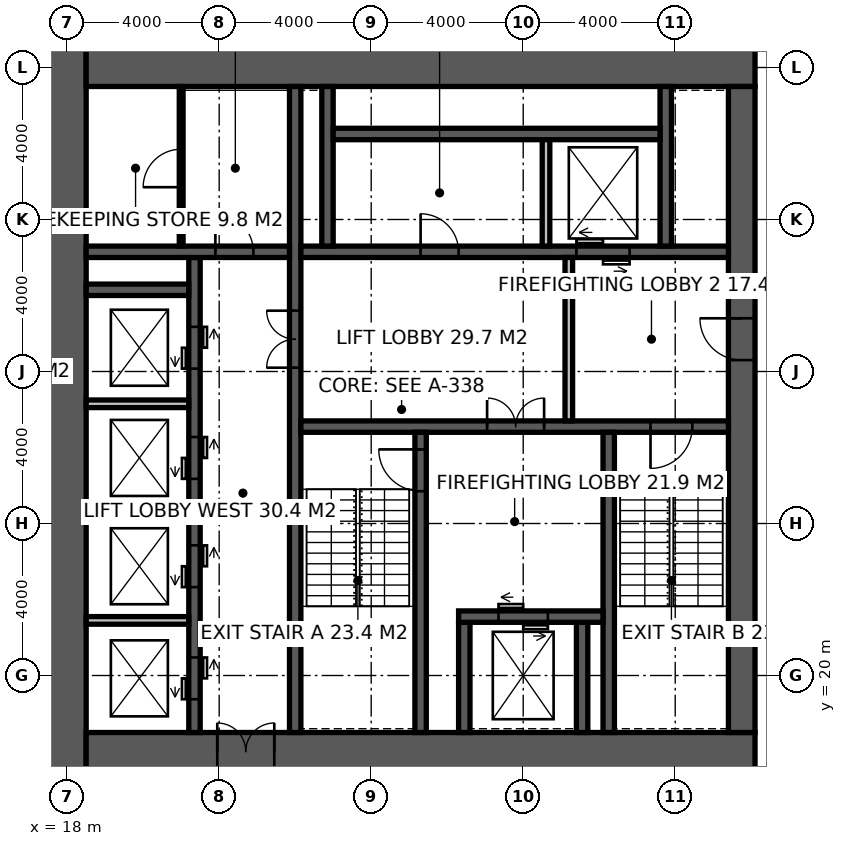
"""IFC4 building model, lengths in metres.
Left out: names, types, materials, properties, quantities, classifications, styles, units other than length and angle.
Written with IfcOpenShell. Run it as: python <this file> out.ifc"""

import sys

from ifc_helpers import new_model, si_unit, direction, frame, frame_2d, origin, place, context, subcontext, project, spatial, rectangle, extrude, element, fill, save


model = new_model("IFC4")
c1 = context("Model", 3, precision=1e-05, world=origin(), true_north=direction((0.0, 1.0)))
c2 = subcontext(c1, "Body", "Model", "MODEL_VIEW")
j1 = project(units=[si_unit("LENGTHUNIT", "METRE"), si_unit("PLANEANGLEUNIT", "RADIAN")], contexts=[c1])
p1 = place(None, origin())
s1 = spatial("IfcSite", under=j1, at=p1, CompositionType="ELEMENT")
p2 = place(p1, origin())
s2 = spatial("IfcBuilding", under=s1, at=p2, CompositionType="ELEMENT")
p3 = place(p2, frame((0.0, 0.0, 238.2)))
s3 = spatial("IfcBuildingStorey", under=s2, at=p3, CompositionType="ELEMENT", Elevation=238.2)
p4 = place(p3, frame((18.0, 17.5, -0.15), z_axis=(0.0, 0.0, 1.0), x_axis=(0.0, 1.0, 0.0)))
e1 = element("IfcWall", 1, at=p4, inside=s3, PredefinedType="SHEAR", context=c2, shape_type="SweptSolid", body=[
    extrude(rectangle(XDim=19.0, YDim=1.0, at=frame_2d((9.5, 0.0))), origin(), (0.0, 0.0, 1.0), 4.0),
])
p5 = place(p3, frame((18.5, 18.0, -0.15), z_axis=(0.0, 0.0, 1.0), x_axis=(1.0, 0.0, 0.0)))
e2 = element("IfcWall", 2, at=p5, inside=s3, PredefinedType="SHEAR", context=c2, shape_type="SweptSolid", body=[
    extrude(rectangle(XDim=17.6, YDim=1.0, at=frame_2d((8.8, 0.0))), origin(), (0.0, 0.0, 1.0), 4.0),
])
p6 = place(p5, frame((3.45, 0.0, 0.15)))
e3 = element("IfcOpeningElement", 3, at=p6, cuts=e2, PredefinedType="OPENING", context=c2, shape_type="SweptSolid", body=[
    extrude(rectangle(XDim=1.5, YDim=2.4, at=frame_2d((0.75, 1.2))), frame((0.0, 0.51, 0.0), z_axis=(0.0, -1.0, 0.0), x_axis=(1.0, 0.0, 0.0)), (0.0, 0.0, 1.0), 1.02),
])
p7 = place(p3, frame((18.5, 36.0, -0.15), z_axis=(0.0, 0.0, 1.0), x_axis=(1.0, 0.0, 0.0)))
e4 = element("IfcWall", 4, at=p7, inside=s3, PredefinedType="SHEAR", context=c2, shape_type="SweptSolid", body=[
    extrude(rectangle(XDim=17.6, YDim=1.0, at=frame_2d((8.8, 0.0))), origin(), (0.0, 0.0, 1.0), 4.0),
])
p8 = place(p3, frame((35.75, 18.5, -0.15), z_axis=(0.0, 0.0, 1.0), x_axis=(0.0, 1.0, 0.0)))
e5 = element("IfcWall", 5, at=p8, inside=s3, PredefinedType="SHEAR", context=c2, shape_type="SweptSolid", body=[
    extrude(rectangle(XDim=17.0, YDim=0.7, at=frame_2d((8.5, 0.0))), origin(), (0.0, 0.0, 1.0), 4.0),
])
p9 = place(p8, frame((9.8, 0.0, 0.15)))
e6 = element("IfcOpeningElement", 6, at=p9, cuts=e5, PredefinedType="OPENING", context=c2, shape_type="SweptSolid", body=[
    extrude(rectangle(XDim=1.1, YDim=2.2, at=frame_2d((0.55, 1.1))), frame((0.0, 0.36, 0.0), z_axis=(0.0, -1.0, 0.0), x_axis=(1.0, 0.0, 0.0)), (0.0, 0.0, 1.0), 0.72),
])
p10 = place(p3, frame((24.0, 18.5, -0.15), z_axis=(0.0, 0.0, 1.0), x_axis=(0.0, 1.0, 0.0)))
e7 = element("IfcWall", 7, at=p10, inside=s3, PredefinedType="SHEAR", context=c2, shape_type="SweptSolid", body=[
    extrude(rectangle(XDim=17.0, YDim=0.3, at=frame_2d((8.5, 0.0))), origin(), (0.0, 0.0, 1.0), 4.0),
])
p11 = place(p10, frame((9.6, 0.0, 0.15)))
e8 = element("IfcOpeningElement", 8, at=p11, cuts=e7, PredefinedType="OPENING", context=c2, shape_type="SweptSolid", body=[
    extrude(rectangle(XDim=1.5, YDim=2.4, at=frame_2d((0.75, 1.2))), frame((0.0, 0.16, 0.0), z_axis=(0.0, -1.0, 0.0), x_axis=(1.0, 0.0, 0.0)), (0.0, 0.0, 1.0), 0.32),
])
p12 = place(p3, frame((24.15, 26.55, -0.15), z_axis=(0.0, 0.0, 1.0), x_axis=(1.0, 0.0, 0.0)))
e9 = element("IfcWall", 9, at=p12, inside=s3, PredefinedType="SHEAR", context=c2, shape_type="SweptSolid", body=[
    extrude(rectangle(XDim=11.25, YDim=0.3, at=frame_2d((5.625, 0.0))), origin(), (0.0, 0.0, 1.0), 4.0),
])
p13 = place(p12, frame((9.2, 0.0, 0.15)))
e10 = element("IfcOpeningElement", 10, at=p13, cuts=e9, PredefinedType="OPENING", context=c2, shape_type="SweptSolid", body=[
    extrude(rectangle(XDim=1.1, YDim=2.2, at=frame_2d((0.55, 1.1))), frame((0.0, 0.16, 0.0), z_axis=(0.0, -1.0, 0.0), x_axis=(1.0, 0.0, 0.0)), (0.0, 0.0, 1.0), 0.32),
])
p14 = place(p12, frame((4.9, 0.0, 0.15)))
e11 = element("IfcOpeningElement", 11, at=p14, cuts=e9, PredefinedType="OPENING", context=c2, shape_type="SweptSolid", body=[
    extrude(rectangle(XDim=1.5, YDim=2.4, at=frame_2d((0.75, 1.2))), frame((0.0, 0.16, 0.0), z_axis=(0.0, -1.0, 0.0), x_axis=(1.0, 0.0, 0.0)), (0.0, 0.0, 1.0), 0.32),
])
p15 = place(p3, frame((27.3, 18.5, -0.15), z_axis=(0.0, 0.0, 1.0), x_axis=(0.0, 1.0, 0.0)))
e12 = element("IfcWall", 12, at=p15, inside=s3, PredefinedType="SHEAR", context=c2, shape_type="SweptSolid", body=[
    extrude(rectangle(XDim=7.9, YDim=0.3, at=frame_2d((3.95, 0.0))), origin(), (0.0, 0.0, 1.0), 4.0),
])
p16 = place(p15, frame((6.35, 0.0, 0.15)))
e13 = element("IfcOpeningElement", 13, at=p16, cuts=e12, PredefinedType="OPENING", context=c2, shape_type="SweptSolid", body=[
    extrude(rectangle(XDim=1.1, YDim=2.2, at=frame_2d((0.55, 1.1))), frame((0.0, 0.16, 0.0), z_axis=(0.0, -1.0, 0.0), x_axis=(1.0, 0.0, 0.0)), (0.0, 0.0, 1.0), 0.32),
])
p17 = place(p3, frame((32.25, 18.5, -0.15), z_axis=(0.0, 0.0, 1.0), x_axis=(0.0, 1.0, 0.0)))
e14 = element("IfcWall", 14, at=p17, inside=s3, PredefinedType="SHEAR", context=c2, shape_type="SweptSolid", body=[
    extrude(rectangle(XDim=7.9, YDim=0.3, at=frame_2d((3.95, 0.0))), origin(), (0.0, 0.0, 1.0), 4.0),
])
for number, where, z_axis, x_axis in (
    (15, (28.45, 18.5, -0.15), (0.0, 0.0, 1.0), (0.0, 1.0, 0.0)),
    (16, (31.55, 18.5, -0.15), (0.0, 0.0, 1.0), (0.0, 1.0, 0.0)),
):
    element("IfcWall", number, at=place(p3, frame(where, z_axis=z_axis, x_axis=x_axis)), inside=s3, PredefinedType="SHEAR", context=c2, shape_type="SweptSolid", body=[
        extrude(rectangle(XDim=2.9, YDim=0.3, at=frame_2d((1.45, 0.0))), origin(), (0.0, 0.0, 1.0), 4.0),
    ])
p18 = place(p3, frame((28.3, 21.55, -0.15), z_axis=(0.0, 0.0, 1.0), x_axis=(1.0, 0.0, 0.0)))
e17 = element("IfcWall", 17, at=p18, inside=s3, PredefinedType="SHEAR", context=c2, shape_type="SweptSolid", body=[
    extrude(rectangle(XDim=3.8, YDim=0.3, at=frame_2d((1.9, 0.0))), origin(), (0.0, 0.0, 1.0), 4.0),
])
p19 = place(p18, frame((1.05, 0.0, 0.15)))
e18 = element("IfcOpeningElement", 18, at=p19, cuts=e17, PredefinedType="OPENING", context=c2, shape_type="SweptSolid", body=[
    extrude(rectangle(XDim=1.3, YDim=2.4, at=frame_2d((0.65, 1.2))), frame((0.0, 0.16, 0.0), z_axis=(0.0, -1.0, 0.0), x_axis=(1.0, 0.0, 0.0)), (0.0, 0.0, 1.0), 0.32),
])
p20 = place(p3, frame((24.15, 31.15, -0.15), z_axis=(0.0, 0.0, 1.0), x_axis=(1.0, 0.0, 0.0)))
e19 = element("IfcWall", 19, at=p20, inside=s3, PredefinedType="SHEAR", context=c2, shape_type="SweptSolid", body=[
    extrude(rectangle(XDim=11.25, YDim=0.3, at=frame_2d((5.625, 0.0))), origin(), (0.0, 0.0, 1.0), 4.0),
])
p21 = place(p20, frame((3.15, 0.0, 0.15)))
e20 = element("IfcOpeningElement", 20, at=p21, cuts=e19, PredefinedType="OPENING", context=c2, shape_type="SweptSolid", body=[
    extrude(rectangle(XDim=1.0, YDim=2.2, at=frame_2d((0.5, 1.1))), frame((0.0, 0.16, 0.0), z_axis=(0.0, -1.0, 0.0), x_axis=(1.0, 0.0, 0.0)), (0.0, 0.0, 1.0), 0.32),
])
p22 = place(p20, frame((7.25, 0.0, 0.15)))
e21 = element("IfcOpeningElement", 21, at=p22, cuts=e19, PredefinedType="OPENING", context=c2, shape_type="SweptSolid", body=[
    extrude(rectangle(XDim=1.4, YDim=2.4, at=frame_2d((0.7, 1.2))), frame((0.0, 0.16, 0.0), z_axis=(0.0, -1.0, 0.0), x_axis=(1.0, 0.0, 0.0)), (0.0, 0.0, 1.0), 0.32),
])
p23 = place(p3, frame((21.35, 18.5, -0.15), z_axis=(0.0, 0.0, 1.0), x_axis=(0.0, 1.0, 0.0)))
e22 = element("IfcWall", 22, at=p23, inside=s3, PredefinedType="SHEAR", context=c2, shape_type="SweptSolid", body=[
    extrude(rectangle(XDim=12.5, YDim=0.3, at=frame_2d((6.25, 0.0))), origin(), (0.0, 0.0, 1.0), 4.0),
])
p24 = place(p23, frame((0.875, 0.0, 0.15)))
e23 = element("IfcOpeningElement", 23, at=p24, cuts=e22, PredefinedType="OPENING", context=c2, shape_type="SweptSolid", body=[
    extrude(rectangle(XDim=1.1, YDim=2.2, at=frame_2d((0.55, 1.1))), frame((0.0, 0.16, 0.0), z_axis=(0.0, -1.0, 0.0), x_axis=(1.0, 0.0, 0.0)), (0.0, 0.0, 1.0), 0.32),
])
p25 = place(p23, frame((3.825, 0.0, 0.15)))
e24 = element("IfcOpeningElement", 24, at=p25, cuts=e22, PredefinedType="OPENING", context=c2, shape_type="SweptSolid", body=[
    extrude(rectangle(XDim=1.1, YDim=2.2, at=frame_2d((0.55, 1.1))), frame((0.0, 0.16, 0.0), z_axis=(0.0, -1.0, 0.0), x_axis=(1.0, 0.0, 0.0)), (0.0, 0.0, 1.0), 0.32),
])
p26 = place(p23, frame((6.675, 0.0, 0.15)))
e25 = element("IfcOpeningElement", 25, at=p26, cuts=e22, PredefinedType="OPENING", context=c2, shape_type="SweptSolid", body=[
    extrude(rectangle(XDim=1.1, YDim=2.2, at=frame_2d((0.55, 1.1))), frame((0.0, 0.16, 0.0), z_axis=(0.0, -1.0, 0.0), x_axis=(1.0, 0.0, 0.0)), (0.0, 0.0, 1.0), 0.32),
])
p27 = place(p23, frame((9.575, 0.0, 0.15)))
e26 = element("IfcOpeningElement", 26, at=p27, cuts=e22, PredefinedType="OPENING", context=c2, shape_type="SweptSolid", body=[
    extrude(rectangle(XDim=1.1, YDim=2.2, at=frame_2d((0.55, 1.1))), frame((0.0, 0.16, 0.0), z_axis=(0.0, -1.0, 0.0), x_axis=(1.0, 0.0, 0.0)), (0.0, 0.0, 1.0), 0.32),
])
p28 = place(p3, frame((18.5, 31.15, -0.15), z_axis=(0.0, 0.0, 1.0), x_axis=(1.0, 0.0, 0.0)))
e27 = element("IfcWall", 27, at=p28, inside=s3, PredefinedType="SHEAR", context=c2, shape_type="SweptSolid", body=[
    extrude(rectangle(XDim=5.35, YDim=0.3, at=frame_2d((2.675, 0.0))), origin(), (0.0, 0.0, 1.0), 4.0),
])
p29 = place(p28, frame((3.4, 0.0, 0.15)))
e28 = element("IfcOpeningElement", 28, at=p29, cuts=e27, PredefinedType="OPENING", context=c2, shape_type="SweptSolid", body=[
    extrude(rectangle(XDim=1.0, YDim=2.2, at=frame_2d((0.5, 1.1))), frame((0.0, 0.16, 0.0), z_axis=(0.0, -1.0, 0.0), x_axis=(1.0, 0.0, 0.0)), (0.0, 0.0, 1.0), 0.32),
])
p30 = place(p3, frame((18.5, 30.15, -0.15), z_axis=(0.0, 0.0, 1.0), x_axis=(1.0, 0.0, 0.0)))
e29 = element("IfcWall", 29, at=p30, inside=s3, PredefinedType="SHEAR", context=c2, shape_type="SweptSolid", body=[
    extrude(rectangle(XDim=2.7, YDim=0.3, at=frame_2d((1.35, 0.0))), origin(), (0.0, 0.0, 1.0), 4.0),
])
for number, where, z_axis, x_axis in (
    (30, (24.85, 31.3, -0.15), (0.0, 0.0, 1.0), (0.0, 1.0, 0.0)),
    (31, (33.75, 31.3, -0.15), (0.0, 0.0, 1.0), (0.0, 1.0, 0.0)),
):
    element("IfcWall", number, at=place(p3, frame(where, z_axis=z_axis, x_axis=x_axis)), inside=s3, PredefinedType="SHEAR", context=c2, shape_type="SweptSolid", body=[
        extrude(rectangle(XDim=4.2, YDim=0.3, at=frame_2d((2.1, 0.0))), origin(), (0.0, 0.0, 1.0), 4.0),
    ])
p31 = place(p3, frame((25.0, 34.25, -0.15), z_axis=(0.0, 0.0, 1.0), x_axis=(1.0, 0.0, 0.0)))
e32 = element("IfcWall", 32, at=p31, inside=s3, PredefinedType="SHEAR", context=c2, shape_type="SweptSolid", body=[
    extrude(rectangle(XDim=8.6, YDim=0.3, at=frame_2d((4.3, 0.0))), origin(), (0.0, 0.0, 1.0), 4.0),
])
p32 = place(p3, frame((30.6, 31.3, -0.15), z_axis=(0.0, 0.0, 1.0), x_axis=(0.0, 1.0, 0.0)))
e33 = element("IfcWall", 33, at=p32, inside=s3, PredefinedType="SOLIDWALL", context=c2, shape_type="SweptSolid", body=[
    extrude(rectangle(XDim=2.8, YDim=0.2, at=frame_2d((1.4, 0.0))), origin(), (0.0, 0.0, 1.0), 4.0),
])
for number, where, z_axis, x_axis in (
    (34, (18.5, 21.45, -0.15), (0.0, 0.0, 1.0), (1.0, 0.0, 0.0)),
    (35, (18.5, 24.3, -0.15), (0.0, 0.0, 1.0), (1.0, 0.0, 0.0)),
    (36, (18.5, 27.15, -0.15), (0.0, 0.0, 1.0), (1.0, 0.0, 0.0)),
):
    element("IfcWall", number, at=place(p3, frame(where, z_axis=z_axis, x_axis=x_axis)), inside=s3, PredefinedType="SOLIDWALL", context=c2, shape_type="SweptSolid", body=[
        extrude(rectangle(XDim=2.7, YDim=0.2, at=frame_2d((1.35, 0.0))), origin(), (0.0, 0.0, 1.0), 4.0),
    ])
p33 = place(p3, frame((31.2, 26.7, 0.0), z_axis=(0.0, 0.0, 1.0), x_axis=(0.0, 1.0, 0.0)))
e37 = element("IfcWall", 37, at=p33, inside=s3, PredefinedType="SOLIDWALL", context=c2, shape_type="SweptSolid", body=[
    extrude(rectangle(XDim=4.3, YDim=0.2, at=frame_2d((2.15, 0.0))), origin(), (0.0, 0.0, 1.0), 3.85),
])
p34 = place(p3, frame((21.0, 31.3, 0.0), z_axis=(0.0, 0.0, 1.0), x_axis=(0.0, 1.0, 0.0)))
e38 = element("IfcWall", 38, at=p34, inside=s3, PredefinedType="PARTITIONING", context=c2, shape_type="SweptSolid", body=[
    extrude(rectangle(XDim=4.2, YDim=0.1, at=frame_2d((2.1, 0.0))), origin(), (0.0, 0.0, 1.0), 3.85),
])
p35 = place(p34, frame((1.55, 0.0, 0.0)))
e39 = element("IfcOpeningElement", 39, at=p35, cuts=e38, PredefinedType="OPENING", context=c2, shape_type="SweptSolid", body=[
    extrude(rectangle(XDim=1.0, YDim=2.2, at=frame_2d((0.5, 1.1))), frame((0.0, 0.06, 0.0), z_axis=(0.0, -1.0, 0.0), x_axis=(1.0, 0.0, 0.0)), (0.0, 0.0, 1.0), 0.12),
])
p36 = place(p16, origin())
e40 = element("IfcDoor", 40, at=p36, inside=s3, OperationType="SINGLE_SWING_RIGHT", PredefinedType="DOOR", context=c2, shape_type="SweptSolid", body=[
    extrude(rectangle(XDim=1.1, YDim=2.2, at=frame_2d((0.55, 1.1))), frame((0.0, 0.025, 0.0), z_axis=(0.0, -1.0, 0.0), x_axis=(1.0, 0.0, 0.0)), (0.0, 0.0, 1.0), 0.05),
])
fill(e13, e40)
p37 = place(p13, frame((1.1, 0.0, 0.0), z_axis=(0.0, 0.0, 1.0), x_axis=(-1.0, 0.0, 0.0)))
e41 = element("IfcDoor", 41, at=p37, inside=s3, OperationType="SINGLE_SWING_RIGHT", PredefinedType="DOOR", context=c2, shape_type="SweptSolid", body=[
    extrude(rectangle(XDim=1.1, YDim=2.2, at=frame_2d((0.55, 1.1))), frame((0.0, 0.025, 0.0), z_axis=(0.0, -1.0, 0.0), x_axis=(1.0, 0.0, 0.0)), (0.0, 0.0, 1.0), 0.05),
])
fill(e10, e41)
p38 = place(p9, origin())
e42 = element("IfcDoor", 42, at=p38, inside=s3, OperationType="SINGLE_SWING_RIGHT", PredefinedType="DOOR", context=c2, shape_type="SweptSolid", body=[
    extrude(rectangle(XDim=1.1, YDim=2.2, at=frame_2d((0.55, 1.1))), frame((0.0, 0.025, 0.0), z_axis=(0.0, -1.0, 0.0), x_axis=(1.0, 0.0, 0.0)), (0.0, 0.0, 1.0), 0.05),
])
fill(e6, e42)
p39 = place(p14, origin())
e43 = element("IfcDoor", 43, at=p39, inside=s3, OperationType="DOUBLE_DOOR_DOUBLE_SWING", PredefinedType="DOOR", context=c2, shape_type="SweptSolid", body=[
    extrude(rectangle(XDim=1.5, YDim=2.4, at=frame_2d((0.75, 1.2))), frame((0.0, 0.025, 0.0), z_axis=(0.0, -1.0, 0.0), x_axis=(1.0, 0.0, 0.0)), (0.0, 0.0, 1.0), 0.05),
])
fill(e11, e43)
p40 = place(p11, origin())
e44 = element("IfcDoor", 44, at=p40, inside=s3, OperationType="DOUBLE_DOOR_DOUBLE_SWING", PredefinedType="DOOR", context=c2, shape_type="SweptSolid", body=[
    extrude(rectangle(XDim=1.5, YDim=2.4, at=frame_2d((0.75, 1.2))), frame((0.0, 0.025, 0.0), z_axis=(0.0, -1.0, 0.0), x_axis=(1.0, 0.0, 0.0)), (0.0, 0.0, 1.0), 0.05),
])
fill(e8, e44)
p41 = place(p29, origin())
e45 = element("IfcDoor", 45, at=p41, inside=s3, OperationType="SINGLE_SWING_LEFT", PredefinedType="DOOR", context=c2, shape_type="SweptSolid", body=[
    extrude(rectangle(XDim=1.0, YDim=2.2, at=frame_2d((0.5, 1.1))), frame((0.0, 0.025, 0.0), z_axis=(0.0, -1.0, 0.0), x_axis=(1.0, 0.0, 0.0)), (0.0, 0.0, 1.0), 0.05),
])
fill(e28, e45)
p42 = place(p35, origin())
e46 = element("IfcDoor", 46, at=p42, inside=s3, OperationType="SINGLE_SWING_LEFT", PredefinedType="DOOR", context=c2, shape_type="SweptSolid", body=[
    extrude(rectangle(XDim=1.0, YDim=2.2, at=frame_2d((0.5, 1.1))), frame((0.0, 0.025, 0.0), z_axis=(0.0, -1.0, 0.0), x_axis=(1.0, 0.0, 0.0)), (0.0, 0.0, 1.0), 0.05),
])
fill(e39, e46)
p43 = place(p21, origin())
e47 = element("IfcDoor", 47, at=p43, inside=s3, OperationType="SINGLE_SWING_LEFT", PredefinedType="DOOR", context=c2, shape_type="SweptSolid", body=[
    extrude(rectangle(XDim=1.0, YDim=2.2, at=frame_2d((0.5, 1.1))), frame((0.0, 0.025, 0.0), z_axis=(0.0, -1.0, 0.0), x_axis=(1.0, 0.0, 0.0)), (0.0, 0.0, 1.0), 0.05),
])
fill(e20, e47)
p44 = place(p6, origin())
e48 = element("IfcDoor", 48, at=p44, inside=s3, OperationType="DOUBLE_DOOR_DOUBLE_SWING", PredefinedType="DOOR", context=c2, shape_type="SweptSolid", body=[
    extrude(rectangle(XDim=1.5, YDim=2.4, at=frame_2d((0.75, 1.2))), frame((0.0, 0.025, 0.0), z_axis=(0.0, -1.0, 0.0), x_axis=(1.0, 0.0, 0.0)), (0.0, 0.0, 1.0), 0.05),
])
fill(e3, e48)
p45 = place(p19, origin())
e49 = element("IfcDoor", 49, at=p45, inside=s3, OperationType="DOUBLE_DOOR_SLIDING", PredefinedType="DOOR", context=c2, shape_type="SweptSolid", body=[
    extrude(rectangle(XDim=1.3, YDim=2.4, at=frame_2d((0.65, 1.2))), frame((0.0, 0.025, 0.0), z_axis=(0.0, -1.0, 0.0), x_axis=(1.0, 0.0, 0.0)), (0.0, 0.0, 1.0), 0.05),
])
fill(e18, e49)
p46 = place(p22, origin())
e50 = element("IfcDoor", 50, at=p46, inside=s3, OperationType="DOUBLE_DOOR_SLIDING", PredefinedType="DOOR", context=c2, shape_type="SweptSolid", body=[
    extrude(rectangle(XDim=1.4, YDim=2.4, at=frame_2d((0.7, 1.2))), frame((0.0, 0.025, 0.0), z_axis=(0.0, -1.0, 0.0), x_axis=(1.0, 0.0, 0.0)), (0.0, 0.0, 1.0), 0.05),
])
fill(e21, e50)
p47 = place(p24, origin())
e51 = element("IfcDoor", 51, at=p47, inside=s3, OperationType="DOUBLE_DOOR_SLIDING", PredefinedType="DOOR", context=c2, shape_type="SweptSolid", body=[
    extrude(rectangle(XDim=1.1, YDim=2.2, at=frame_2d((0.55, 1.1))), frame((0.0, 0.025, 0.0), z_axis=(0.0, -1.0, 0.0), x_axis=(1.0, 0.0, 0.0)), (0.0, 0.0, 1.0), 0.05),
])
fill(e23, e51)
p48 = place(p25, origin())
e52 = element("IfcDoor", 52, at=p48, inside=s3, OperationType="DOUBLE_DOOR_SLIDING", PredefinedType="DOOR", context=c2, shape_type="SweptSolid", body=[
    extrude(rectangle(XDim=1.1, YDim=2.2, at=frame_2d((0.55, 1.1))), frame((0.0, 0.025, 0.0), z_axis=(0.0, -1.0, 0.0), x_axis=(1.0, 0.0, 0.0)), (0.0, 0.0, 1.0), 0.05),
])
fill(e24, e52)
p49 = place(p26, origin())
e53 = element("IfcDoor", 53, at=p49, inside=s3, OperationType="DOUBLE_DOOR_SLIDING", PredefinedType="DOOR", context=c2, shape_type="SweptSolid", body=[
    extrude(rectangle(XDim=1.1, YDim=2.2, at=frame_2d((0.55, 1.1))), frame((0.0, 0.025, 0.0), z_axis=(0.0, -1.0, 0.0), x_axis=(1.0, 0.0, 0.0)), (0.0, 0.0, 1.0), 0.05),
])
fill(e25, e53)
p50 = place(p27, origin())
e54 = element("IfcDoor", 54, at=p50, inside=s3, OperationType="DOUBLE_DOOR_SLIDING", PredefinedType="DOOR", context=c2, shape_type="SweptSolid", body=[
    extrude(rectangle(XDim=1.1, YDim=2.2, at=frame_2d((0.55, 1.1))), frame((0.0, 0.025, 0.0), z_axis=(0.0, -1.0, 0.0), x_axis=(1.0, 0.0, 0.0)), (0.0, 0.0, 1.0), 0.05),
])
fill(e26, e54)
save(model, sys.argv[1])
